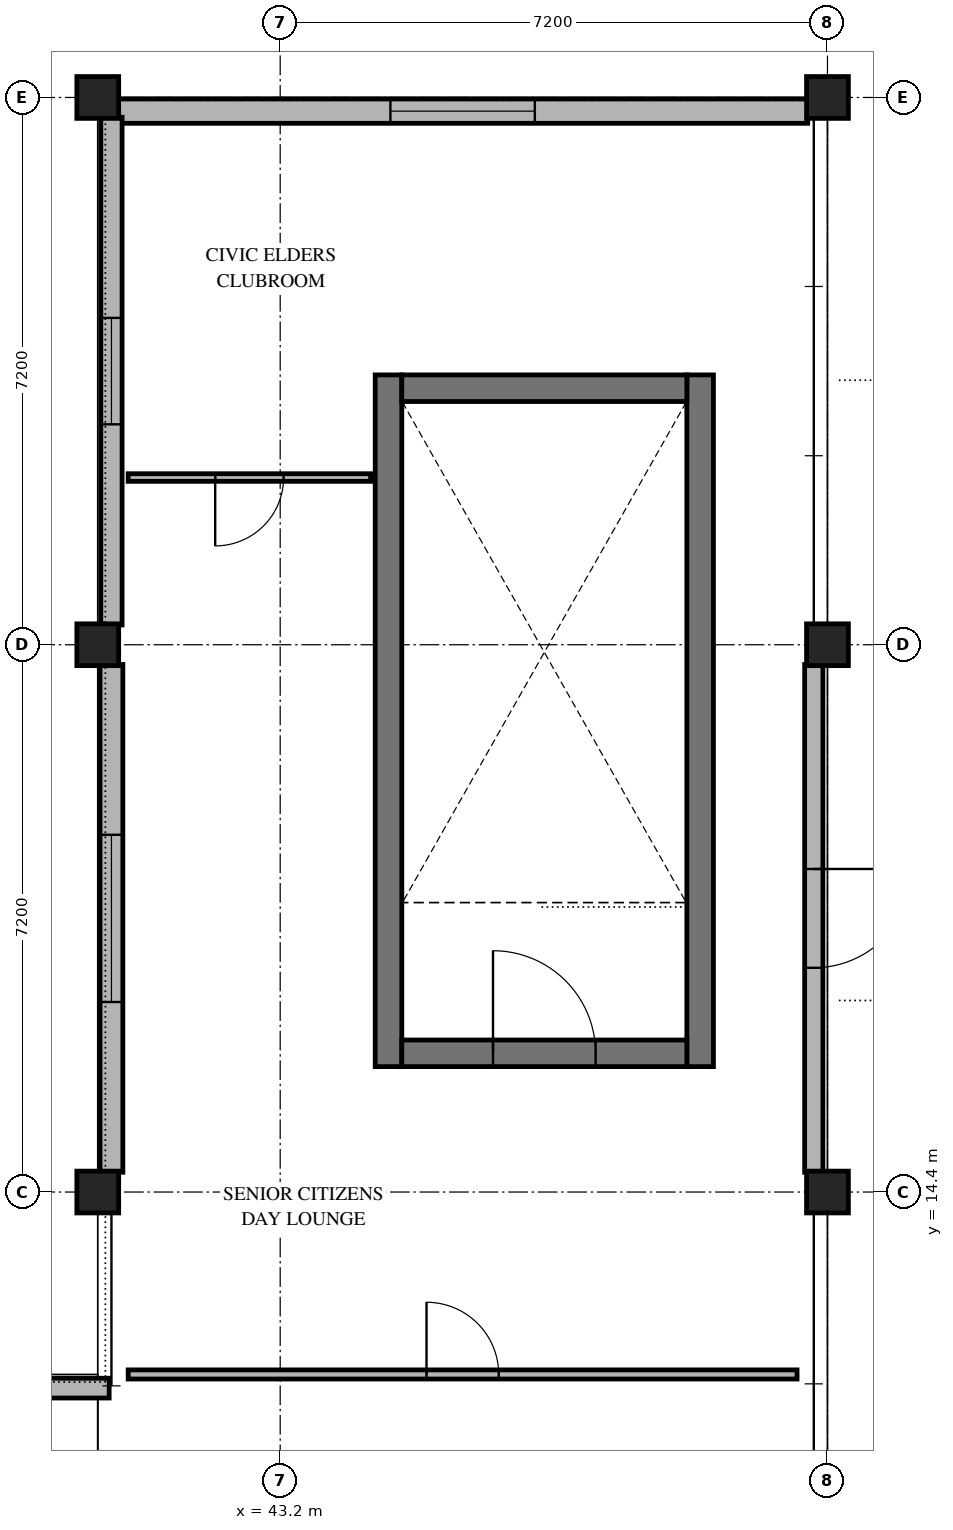
"""IFC4 building model, lengths in metres.
Left out: names, types, materials, properties, quantities, classifications, styles, units other than length and angle.
Written with IfcOpenShell. Run it as: python <this file> out.ifc"""

import sys

from ifc_helpers import new_model, si_unit, direction, frame, frame_2d, origin, origin_2d, place, context, subcontext, project, spatial, rectangle, extrude, element, fill, save


model = new_model("IFC4")
c1 = context("Model", 3, precision=1e-05, world=origin(), true_north=direction((0.0, 1.0)))
c2 = subcontext(c1, "Body", "Model", "MODEL_VIEW")
j1 = project(units=[si_unit("LENGTHUNIT", "METRE"), si_unit("PLANEANGLEUNIT", "RADIAN")], contexts=[c1])
p1 = place(None, origin())
s1 = spatial("IfcSite", under=j1, at=p1, CompositionType="ELEMENT")
p2 = place(p1, origin())
s2 = spatial("IfcBuilding", under=s1, at=p2, CompositionType="ELEMENT")
p3 = place(p2, frame((0.0, 0.0, 12.9)))
s3 = spatial("IfcBuildingStorey", under=s2, at=p3, CompositionType="ELEMENT", Elevation=12.9)
for number, where, z_axis, x_axis in (
    (1, (40.8, 14.4, 0.0), (0.0, 0.0, 1.0), (1.0, 0.0, 0.0)),
    (2, (40.8, 21.6, 0.0), (0.0, 0.0, 1.0), (1.0, 0.0, 0.0)),
    (3, (40.8, 28.8, 0.0), (0.0, 0.0, 1.0), (1.0, 0.0, 0.0)),
    (4, (50.4, 14.4, 0.0), (0.0, 0.0, 1.0), (1.0, 0.0, 0.0)),
    (5, (50.4, 21.6, 0.0), (0.0, 0.0, 1.0), (1.0, 0.0, 0.0)),
    (6, (50.4, 28.8, 0.0), (0.0, 0.0, 1.0), (1.0, 0.0, 0.0)),
):
    element("IfcColumn", number, at=place(p3, frame(where, z_axis=z_axis, x_axis=x_axis)), inside=s3, PredefinedType="COLUMN", context=c2, shape_type="SweptSolid", body=[
        extrude(rectangle(XDim=0.55, YDim=0.55, at=origin_2d()), origin(), (0.0, 0.0, 1.0), 3.9),
    ])
p4 = place(p3, frame((50.22, 21.34, 0.0), z_axis=(0.0, 0.0, 1.0), x_axis=(0.0, -1.0, 0.0)))
e7 = element("IfcWall", 7, at=p4, inside=s3, PredefinedType="SOLIDWALL", context=c2, shape_type="SweptSolid", body=[
    extrude(rectangle(XDim=6.68, YDim=0.24, at=frame_2d((3.34, 0.0))), origin(), (0.0, 0.0, 1.0), 3.66),
])
p5 = place(p4, frame((2.69, 0.0, 0.0)))
e8 = element("IfcOpeningElement", 8, at=p5, cuts=e7, PredefinedType="OPENING", context=c2, shape_type="SweptSolid", body=[
    extrude(rectangle(XDim=1.3, YDim=2.2, at=frame_2d((0.65, 1.1))), frame((0.0, 0.13, 0.0), z_axis=(0.0, -1.0, 0.0), x_axis=(1.0, 0.0, 0.0)), (0.0, 0.0, 1.0), 0.26),
])
p6 = place(p3, frame((41.06, 28.62, 0.0), z_axis=(0.0, 0.0, 1.0), x_axis=(1.0, 0.0, 0.0)))
e9 = element("IfcWall", 9, at=p6, inside=s3, PredefinedType="SOLIDWALL", context=c2, shape_type="SweptSolid", body=[
    extrude(rectangle(XDim=9.08, YDim=0.32, at=frame_2d((4.54, 0.0))), origin(), (0.0, 0.0, 1.0), 2.9),
])
p7 = place(p6, frame((3.59, 0.0, 0.75)))
e10 = element("IfcOpeningElement", 10, at=p7, cuts=e9, PredefinedType="OPENING", context=c2, shape_type="SweptSolid", body=[
    extrude(rectangle(XDim=1.9, YDim=1.45, at=frame_2d((0.95, 0.725))), frame((0.0, 0.17, 0.0), z_axis=(0.0, -1.0, 0.0), x_axis=(1.0, 0.0, 0.0)), (0.0, 0.0, 1.0), 0.34),
])
p8 = place(p3, frame((40.98, 14.66, 0.0), z_axis=(0.0, 0.0, 1.0), x_axis=(0.0, 1.0, 0.0)))
e11 = element("IfcWall", 11, at=p8, inside=s3, PredefinedType="SOLIDWALL", context=c2, shape_type="SweptSolid", body=[
    extrude(rectangle(XDim=6.68, YDim=0.3, at=frame_2d((3.34, 0.0))), origin(), (0.0, 0.0, 1.0), 2.9),
])
p9 = place(p8, frame((2.24, 0.0, 0.75)))
e12 = element("IfcOpeningElement", 12, at=p9, cuts=e11, PredefinedType="OPENING", context=c2, shape_type="SweptSolid", body=[
    extrude(rectangle(XDim=2.2, YDim=1.45, at=frame_2d((1.1, 0.725))), frame((0.0, 0.16, 0.0), z_axis=(0.0, -1.0, 0.0), x_axis=(1.0, 0.0, 0.0)), (0.0, 0.0, 1.0), 0.32),
])
p10 = place(p3, frame((40.98, 21.86, 0.0), z_axis=(0.0, 0.0, 1.0), x_axis=(0.0, 1.0, 0.0)))
e13 = element("IfcWall", 13, at=p10, inside=s3, PredefinedType="SOLIDWALL", context=c2, shape_type="SweptSolid", body=[
    extrude(rectangle(XDim=6.68, YDim=0.28, at=frame_2d((3.34, 0.0))), origin(), (0.0, 0.0, 1.0), 2.9),
])
p11 = place(p10, frame((2.64, 0.0, 0.9)))
e14 = element("IfcOpeningElement", 14, at=p11, cuts=e13, PredefinedType="OPENING", context=c2, shape_type="SweptSolid", body=[
    extrude(rectangle(XDim=1.4, YDim=0.85, at=frame_2d((0.7, 0.425))), frame((0.0, 0.15, 0.0), z_axis=(0.0, -1.0, 0.0), x_axis=(1.0, 0.0, 0.0)), (0.0, 0.0, 1.0), 0.3),
])
p12 = place(p3, frame((11.85, 11.82, 0.0), z_axis=(0.0, 0.0, 1.0), x_axis=(1.0, 0.0, 0.0)))
e15 = element("IfcWall", 15, at=p12, inside=s3, PredefinedType="SOLIDWALL", context=c2, shape_type="SweptSolid", body=[
    extrude(rectangle(XDim=29.1, YDim=0.26, at=frame_2d((14.55, 0.0))), origin(), (0.0, 0.0, 1.0), 3.66),
])
p13 = place(p12, frame((13.7, 0.0, 0.9)))
e16 = element("IfcOpeningElement", 16, at=p13, cuts=e15, PredefinedType="OPENING", context=c2, shape_type="SweptSolid", body=[
    extrude(rectangle(XDim=1.7, YDim=0.85, at=frame_2d((0.85, 0.425))), frame((0.0, 0.14, 0.0), z_axis=(0.0, -1.0, 0.0), x_axis=(1.0, 0.0, 0.0)), (0.0, 0.0, 1.0), 0.28),
])
for number, where, z_axis, x_axis in (
    (17, (48.725, 16.05, 0.0), (0.0, 0.0, 1.0), (0.0, 1.0, 0.0)),
    (18, (44.625, 25.15, 0.0), (0.0, 0.0, 1.0), (0.0, -1.0, 0.0)),
):
    element("IfcWall", number, at=place(p3, frame(where, z_axis=z_axis, x_axis=x_axis)), inside=s3, PredefinedType="SHEAR", context=c2, shape_type="SweptSolid", body=[
        extrude(rectangle(XDim=9.1, YDim=0.35, at=frame_2d((4.55, 0.0))), origin(), (0.0, 0.0, 1.0), 3.66),
    ])
p14 = place(p3, frame((48.55, 24.975, 0.0), z_axis=(0.0, 0.0, 1.0), x_axis=(-1.0, 0.0, 0.0)))
e19 = element("IfcWall", 19, at=p14, inside=s3, PredefinedType="SHEAR", context=c2, shape_type="SweptSolid", body=[
    extrude(rectangle(XDim=3.75, YDim=0.35, at=frame_2d((1.875, 0.0))), origin(), (0.0, 0.0, 1.0), 3.66),
])
p15 = place(p3, frame((44.8, 16.225, 0.0), z_axis=(0.0, 0.0, 1.0), x_axis=(1.0, 0.0, 0.0)))
e20 = element("IfcWall", 20, at=p15, inside=s3, PredefinedType="SHEAR", context=c2, shape_type="SweptSolid", body=[
    extrude(rectangle(XDim=3.75, YDim=0.35, at=frame_2d((1.875, 0.0))), origin(), (0.0, 0.0, 1.0), 3.66),
])
p16 = place(p15, frame((1.2, 0.0, 0.0)))
e21 = element("IfcOpeningElement", 21, at=p16, cuts=e20, PredefinedType="OPENING", context=c2, shape_type="SweptSolid", body=[
    extrude(rectangle(XDim=1.35, YDim=2.2, at=frame_2d((0.675, 1.1))), frame((0.0, 0.185, 0.0), z_axis=(0.0, -1.0, 0.0), x_axis=(1.0, 0.0, 0.0)), (0.0, 0.0, 1.0), 0.37),
])
p17 = place(p3, frame((41.2, 12.0, 0.0), z_axis=(0.0, 0.0, 1.0), x_axis=(1.0, 0.0, 0.0)))
e22 = element("IfcWall", 22, at=p17, inside=s3, PredefinedType="PARTITIONING", context=c2, shape_type="SweptSolid", body=[
    extrude(rectangle(XDim=8.8, YDim=0.12, at=frame_2d((4.4, 0.0))), origin(), (0.0, 0.0, 1.0), 3.66),
])
p18 = place(p17, frame((3.925, 0.0, 0.0)))
e23 = element("IfcOpeningElement", 23, at=p18, cuts=e22, PredefinedType="OPENING", context=c2, shape_type="SweptSolid", body=[
    extrude(rectangle(XDim=0.95, YDim=2.15, at=frame_2d((0.475, 1.075))), frame((0.0, 0.07, 0.0), z_axis=(0.0, -1.0, 0.0), x_axis=(1.0, 0.0, 0.0)), (0.0, 0.0, 1.0), 0.14),
])
p19 = place(p3, frame((44.39, 23.8, 0.0), z_axis=(0.0, 0.0, 1.0), x_axis=(-1.0, 0.0, 0.0)))
e24 = element("IfcWall", 24, at=p19, inside=s3, PredefinedType="PARTITIONING", context=c2, shape_type="SweptSolid", body=[
    extrude(rectangle(XDim=3.19, YDim=0.1, at=frame_2d((1.595, 0.0))), origin(), (0.0, 0.0, 1.0), 3.66),
])
p20 = place(p19, frame((1.145, 0.0, 0.0)))
e25 = element("IfcOpeningElement", 25, at=p20, cuts=e24, PredefinedType="OPENING", context=c2, shape_type="SweptSolid", body=[
    extrude(rectangle(XDim=0.9, YDim=2.1, at=frame_2d((0.45, 1.05))), frame((0.0, 0.06, 0.0), z_axis=(0.0, -1.0, 0.0), x_axis=(1.0, 0.0, 0.0)), (0.0, 0.0, 1.0), 0.12),
])
p21 = place(p5, origin())
e26 = element("IfcDoor", 26, at=p21, inside=s3, OperationType="SINGLE_SWING_LEFT", PredefinedType="DOOR", context=c2, shape_type="SweptSolid", body=[
    extrude(rectangle(XDim=1.3, YDim=2.2, at=frame_2d((0.65, 1.1))), frame((0.0, 0.025, 0.0), z_axis=(0.0, -1.0, 0.0), x_axis=(1.0, 0.0, 0.0)), (0.0, 0.0, 1.0), 0.05),
])
fill(e8, e26)
p22 = place(p7, origin())
e27 = element("IfcWindow", 27, at=p22, inside=s3, PartitioningType="SINGLE_PANEL", PredefinedType="WINDOW", context=c2, shape_type="SweptSolid", body=[
    extrude(rectangle(XDim=1.9, YDim=1.45, at=frame_2d((0.95, 0.725))), frame((0.0, 0.03, 0.0), z_axis=(0.0, -1.0, 0.0), x_axis=(1.0, 0.0, 0.0)), (0.0, 0.0, 1.0), 0.06),
])
fill(e10, e27)
p23 = place(p9, origin())
e28 = element("IfcWindow", 28, at=p23, inside=s3, PartitioningType="SINGLE_PANEL", PredefinedType="WINDOW", context=c2, shape_type="SweptSolid", body=[
    extrude(rectangle(XDim=2.2, YDim=1.45, at=frame_2d((1.1, 0.725))), frame((0.0, 0.03, 0.0), z_axis=(0.0, -1.0, 0.0), x_axis=(1.0, 0.0, 0.0)), (0.0, 0.0, 1.0), 0.06),
])
fill(e12, e28)
p24 = place(p11, origin())
e29 = element("IfcWindow", 29, at=p24, inside=s3, PartitioningType="SINGLE_PANEL", PredefinedType="WINDOW", context=c2, shape_type="SweptSolid", body=[
    extrude(rectangle(XDim=1.4, YDim=0.85, at=frame_2d((0.7, 0.425))), frame((0.0, 0.03, 0.0), z_axis=(0.0, -1.0, 0.0), x_axis=(1.0, 0.0, 0.0)), (0.0, 0.0, 1.0), 0.06),
])
fill(e14, e29)
p25 = place(p16, origin())
e30 = element("IfcDoor", 30, at=p25, inside=s3, OperationType="SINGLE_SWING_LEFT", PredefinedType="DOOR", context=c2, shape_type="SweptSolid", body=[
    extrude(rectangle(XDim=1.35, YDim=2.2, at=frame_2d((0.675, 1.1))), frame((0.0, 0.025, 0.0), z_axis=(0.0, -1.0, 0.0), x_axis=(1.0, 0.0, 0.0)), (0.0, 0.0, 1.0), 0.05),
])
fill(e21, e30)
p26 = place(p18, origin())
e31 = element("IfcDoor", 31, at=p26, inside=s3, OperationType="SINGLE_SWING_LEFT", PredefinedType="DOOR", context=c2, shape_type="SweptSolid", body=[
    extrude(rectangle(XDim=0.95, YDim=2.15, at=frame_2d((0.475, 1.075))), frame((0.0, 0.025, 0.0), z_axis=(0.0, -1.0, 0.0), x_axis=(1.0, 0.0, 0.0)), (0.0, 0.0, 1.0), 0.05),
])
fill(e23, e31)
p27 = place(p20, origin())
e32 = element("IfcDoor", 32, at=p27, inside=s3, OperationType="SINGLE_SWING_RIGHT", PredefinedType="DOOR", context=c2, shape_type="SweptSolid", body=[
    extrude(rectangle(XDim=0.9, YDim=2.1, at=frame_2d((0.45, 1.05))), frame((0.0, 0.025, 0.0), z_axis=(0.0, -1.0, 0.0), x_axis=(1.0, 0.0, 0.0)), (0.0, 0.0, 1.0), 0.05),
])
fill(e25, e32)
save(model, sys.argv[1])
